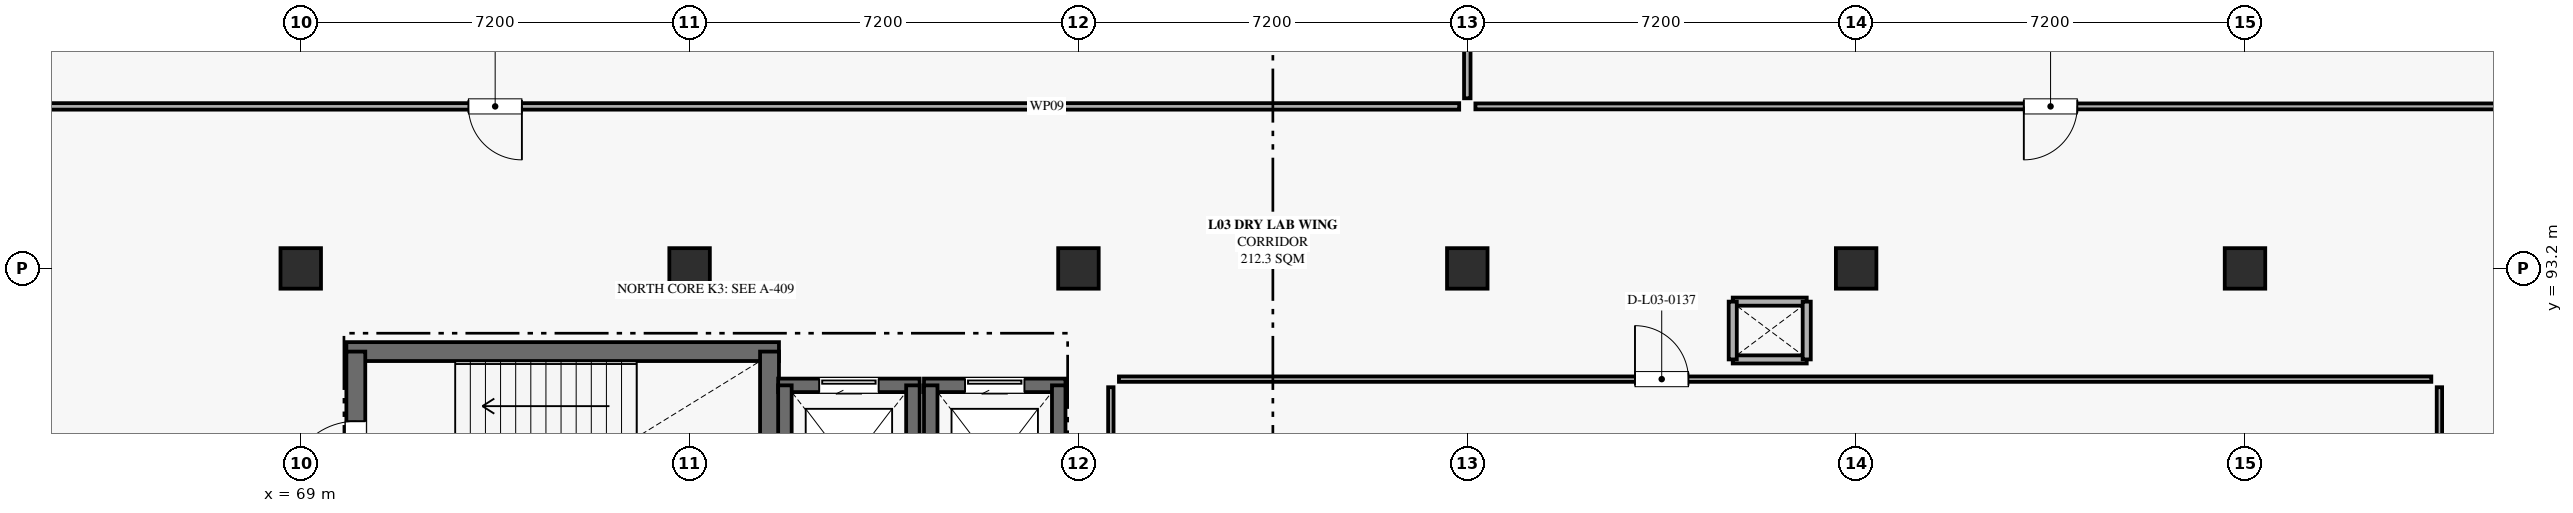
"""IFC4 building model, lengths in metres.
Left out: names, types, materials, properties, quantities, classifications, styles, units other than length and angle.
Written with IfcOpenShell. Run it as: python <this file> out.ifc"""

import sys

from ifc_helpers import new_model, si_unit, direction, frame, frame_2d, origin, origin_2d, place, context, subcontext, project, spatial, rectangle, extrude, element, fill, save


model = new_model("IFC4")
c1 = context("Model", 3, precision=1e-05, world=origin(), true_north=direction((0.0, 1.0)))
c2 = subcontext(c1, "Body", "Model", "MODEL_VIEW")
j1 = project(units=[si_unit("LENGTHUNIT", "METRE"), si_unit("PLANEANGLEUNIT", "RADIAN")], contexts=[c1])
p1 = place(None, origin())
s1 = spatial("IfcSite", under=j1, at=p1, CompositionType="ELEMENT")
p2 = place(p1, origin())
s2 = spatial("IfcBuilding", under=s1, at=p2, CompositionType="ELEMENT")
p3 = place(p2, frame((0.0, 0.0, 15.12)))
s3 = spatial("IfcBuildingStorey", under=s2, at=p3, CompositionType="ELEMENT", Elevation=15.12)
for number, where, z_axis, x_axis in (
    (1, (69.0, 93.2, 0.0), (0.0, 0.0, 1.0), (1.0, 0.0, 0.0)),
    (2, (76.2, 93.2, 0.0), (0.0, 0.0, 1.0), (1.0, 0.0, 0.0)),
    (3, (83.4, 93.2, 0.0), (0.0, 0.0, 1.0), (1.0, 0.0, 0.0)),
    (4, (90.6, 93.2, 0.0), (0.0, 0.0, 1.0), (1.0, 0.0, 0.0)),
    (5, (97.8, 93.2, 0.0), (0.0, 0.0, 1.0), (1.0, 0.0, 0.0)),
    (6, (105.0, 93.2, 0.0), (0.0, 0.0, 1.0), (1.0, 0.0, 0.0)),
):
    element("IfcColumn", number, at=place(p3, frame(where, z_axis=z_axis, x_axis=x_axis)), inside=s3, PredefinedType="COLUMN", context=c2, shape_type="SweptSolid", body=[
        extrude(rectangle(XDim=0.75, YDim=0.75, at=origin_2d()), origin(), (0.0, 0.0, 1.0), 4.68),
    ])
p4 = place(p3, frame((69.845, 91.66, 0.0), z_axis=(0.0, 0.0, 1.0), x_axis=(1.0, 0.0, 0.0)))
e7 = element("IfcWall", 7, at=p4, inside=s3, PredefinedType="SHEAR", context=c2, shape_type="SweptSolid", body=[
    extrude(rectangle(XDim=8.01, YDim=0.35, at=frame_2d((4.005, 0.0))), origin(), (0.0, 0.0, 1.0), 4.41),
])
p5 = place(p3, frame((70.02, 87.82, 0.0), z_axis=(0.0, 0.0, 1.0), x_axis=(0.0, 1.0, 0.0)))
e8 = element("IfcWall", 8, at=p5, inside=s3, PredefinedType="SHEAR", context=c2, shape_type="SweptSolid", body=[
    extrude(rectangle(XDim=3.84, YDim=0.35, at=frame_2d((1.92, 0.0))), origin(), (0.0, 0.0, 1.0), 4.41),
])
p6 = place(p5, frame((1.29, 0.0, 0.0)))
e9 = element("IfcOpeningElement", 9, at=p6, cuts=e8, PredefinedType="OPENING", context=c2, shape_type="SweptSolid", body=[
    extrude(rectangle(XDim=1.26, YDim=2.06, at=frame_2d((0.63, 1.03))), frame((0.0, 0.185, 0.0), z_axis=(0.0, -1.0, 0.0), x_axis=(1.0, 0.0, 0.0)), (0.0, 0.0, 1.0), 0.37),
])
p7 = place(p3, frame((77.68, 91.66, 0.0), z_axis=(0.0, 0.0, 1.0), x_axis=(0.0, -1.0, 0.0)))
e10 = element("IfcWall", 10, at=p7, inside=s3, PredefinedType="SHEAR", context=c2, shape_type="SweptSolid", body=[
    extrude(rectangle(XDim=3.84, YDim=0.35, at=frame_2d((1.92, 0.0))), origin(), (0.0, 0.0, 1.0), 4.41),
])
for number, where, z_axis, x_axis in (
    (11, (96.885, 91.515, 0.0), (0.0, 0.0, 1.0), (-1.0, 0.0, 0.0)),
    (12, (95.515, 92.585, 0.0), (0.0, 0.0, 1.0), (1.0, 0.0, 0.0)),
):
    element("IfcWall", number, at=place(p3, frame(where, z_axis=z_axis, x_axis=x_axis)), inside=s3, PredefinedType="PARTITIONING", context=c2, shape_type="SweptSolid", body=[
        extrude(rectangle(XDim=1.37, YDim=0.15, at=frame_2d((0.685, 0.0))), origin(), (0.0, 0.0, 1.0), 3.16),
    ])
for number, where, z_axis, x_axis in (
    (13, (95.515, 91.515, 0.0), (0.0, 0.0, 1.0), (0.0, 1.0, 0.0)),
    (14, (96.885, 92.585, 0.0), (0.0, 0.0, 1.0), (0.0, -1.0, 0.0)),
):
    element("IfcWall", number, at=place(p3, frame(where, z_axis=z_axis, x_axis=x_axis)), inside=s3, PredefinedType="PARTITIONING", context=c2, shape_type="SweptSolid", body=[
        extrude(rectangle(XDim=1.07, YDim=0.15, at=frame_2d((0.535, 0.0))), origin(), (0.0, 0.0, 1.0), 3.16),
    ])
p8 = place(p3, frame((77.84, 91.035, 0.0), z_axis=(0.0, 0.0, 1.0), x_axis=(1.0, 0.0, 0.0)))
e15 = element("IfcWall", 15, at=p8, inside=s3, PredefinedType="SHEAR", context=c2, shape_type="SweptSolid", body=[
    extrude(rectangle(XDim=2.62, YDim=0.25, at=frame_2d((1.31, 0.0))), origin(), (0.0, 0.0, 1.0), 4.41),
])
p9 = place(p8, frame((0.76, 0.0, 0.0)))
e16 = element("IfcOpeningElement", 16, at=p9, cuts=e15, PredefinedType="OPENING", context=c2, shape_type="SweptSolid", body=[
    extrude(rectangle(XDim=1.1, YDim=2.2, at=frame_2d((0.55, 1.1))), frame((0.0, 0.135, 0.0), z_axis=(0.0, -1.0, 0.0), x_axis=(1.0, 0.0, 0.0)), (0.0, 0.0, 1.0), 0.27),
])
for number, where, z_axis, x_axis in (
    (17, (77.965, 88.065, 0.0), (0.0, 0.0, 1.0), (0.0, 1.0, 0.0)),
    (18, (80.335, 91.035, 0.0), (0.0, 0.0, 1.0), (0.0, -1.0, 0.0)),
):
    element("IfcWall", number, at=place(p3, frame(where, z_axis=z_axis, x_axis=x_axis)), inside=s3, PredefinedType="SHEAR", context=c2, shape_type="SweptSolid", body=[
        extrude(rectangle(XDim=2.97, YDim=0.25, at=frame_2d((1.485, 0.0))), origin(), (0.0, 0.0, 1.0), 4.41),
    ])
p10 = place(p3, frame((80.54, 91.035, 0.0), z_axis=(0.0, 0.0, 1.0), x_axis=(1.0, 0.0, 0.0)))
e19 = element("IfcWall", 19, at=p10, inside=s3, PredefinedType="SHEAR", context=c2, shape_type="SweptSolid", body=[
    extrude(rectangle(XDim=2.62, YDim=0.25, at=frame_2d((1.31, 0.0))), origin(), (0.0, 0.0, 1.0), 4.41),
])
p11 = place(p10, frame((0.76, 0.0, 0.0)))
e20 = element("IfcOpeningElement", 20, at=p11, cuts=e19, PredefinedType="OPENING", context=c2, shape_type="SweptSolid", body=[
    extrude(rectangle(XDim=1.1, YDim=2.2, at=frame_2d((0.55, 1.1))), frame((0.0, 0.135, 0.0), z_axis=(0.0, -1.0, 0.0), x_axis=(1.0, 0.0, 0.0)), (0.0, 0.0, 1.0), 0.27),
])
for number, where, z_axis, x_axis in (
    (21, (80.665, 88.065, 0.0), (0.0, 0.0, 1.0), (0.0, 1.0, 0.0)),
    (22, (83.035, 91.035, 0.0), (0.0, 0.0, 1.0), (0.0, -1.0, 0.0)),
):
    element("IfcWall", number, at=place(p3, frame(where, z_axis=z_axis, x_axis=x_axis)), inside=s3, PredefinedType="SHEAR", context=c2, shape_type="SweptSolid", body=[
        extrude(rectangle(XDim=2.97, YDim=0.25, at=frame_2d((1.485, 0.0))), origin(), (0.0, 0.0, 1.0), 4.41),
    ])
p12 = place(p3, frame((90.45, 96.2, 0.0), z_axis=(0.0, 0.0, 1.0), x_axis=(-1.0, 0.0, 0.0)))
e23 = element("IfcWall", 23, at=p12, inside=s3, PredefinedType="PARTITIONING", context=c2, shape_type="SweptSolid", body=[
    extrude(rectangle(XDim=28.3, YDim=0.12, at=frame_2d((14.15, 0.0))), origin(), (0.0, 0.0, 1.0), 3.16),
])
p13 = place(p12, frame((17.355, 0.0, 0.0)))
e24 = element("IfcOpeningElement", 24, at=p13, cuts=e23, PredefinedType="OPENING", context=c2, shape_type="SweptSolid", body=[
    extrude(rectangle(XDim=0.99, YDim=2.05, at=frame_2d((0.495, 1.025))), frame((0.0, 0.07, 0.0), z_axis=(0.0, -1.0, 0.0), x_axis=(1.0, 0.0, 0.0)), (0.0, 0.0, 1.0), 0.14),
])
p14 = place(p3, frame((90.6, 114.2, 0.0), z_axis=(0.0, 0.0, 1.0), x_axis=(0.0, -1.0, 0.0)))
e25 = element("IfcWall", 25, at=p14, inside=s3, PredefinedType="PARTITIONING", context=c2, shape_type="SweptSolid", body=[
    extrude(rectangle(XDim=17.85, YDim=0.12, at=frame_2d((8.925, 0.0))), origin(), (0.0, 0.0, 1.0), 3.16),
])
p15 = place(p3, frame((111.85, 96.2, 0.0), z_axis=(0.0, 0.0, 1.0), x_axis=(-1.0, 0.0, 0.0)))
e26 = element("IfcWall", 26, at=p15, inside=s3, PredefinedType="PARTITIONING", context=c2, shape_type="SweptSolid", body=[
    extrude(rectangle(XDim=21.1, YDim=0.11, at=frame_2d((10.55, 0.0))), origin(), (0.0, 0.0, 1.0), 3.16),
])
p16 = place(p15, frame((9.955, 0.0, 0.0)))
e27 = element("IfcOpeningElement", 27, at=p16, cuts=e26, PredefinedType="OPENING", context=c2, shape_type="SweptSolid", body=[
    extrude(rectangle(XDim=0.99, YDim=2.1, at=frame_2d((0.495, 1.05))), frame((0.0, 0.065, 0.0), z_axis=(0.0, -1.0, 0.0), x_axis=(1.0, 0.0, 0.0)), (0.0, 0.0, 1.0), 0.13),
])
p17 = place(p3, frame((84.15, 91.15, 0.0), z_axis=(0.0, 0.0, 1.0), x_axis=(1.0, 0.0, 0.0)))
e28 = element("IfcWall", 28, at=p17, inside=s3, PredefinedType="PARTITIONING", context=c2, shape_type="SweptSolid", body=[
    extrude(rectangle(XDim=24.3, YDim=0.1, at=frame_2d((12.15, 0.0))), origin(), (0.0, 0.0, 1.0), 3.16),
])
p18 = place(p17, frame((9.555, 0.0, 0.0)))
e29 = element("IfcOpeningElement", 29, at=p18, cuts=e28, PredefinedType="OPENING", context=c2, shape_type="SweptSolid", body=[
    extrude(rectangle(XDim=0.99, YDim=2.16, at=frame_2d((0.495, 1.08))), frame((0.0, 0.06, 0.0), z_axis=(0.0, -1.0, 0.0), x_axis=(1.0, 0.0, 0.0)), (0.0, 0.0, 1.0), 0.12),
])
for number, where, z_axis, x_axis in (
    (30, (84.0, 86.35, 0.0), (0.0, 0.0, 1.0), (0.0, 1.0, 0.0)),
    (31, (108.6, 91.0, 0.0), (0.0, 0.0, 1.0), (0.0, -1.0, 0.0)),
):
    element("IfcWall", number, at=place(p3, frame(where, z_axis=z_axis, x_axis=x_axis)), inside=s3, PredefinedType="PARTITIONING", context=c2, shape_type="SweptSolid", body=[
        extrude(rectangle(XDim=4.65, YDim=0.1, at=frame_2d((2.325, 0.0))), origin(), (0.0, 0.0, 1.0), 3.16),
    ])
p19 = place(p6, origin())
e32 = element("IfcDoor", 32, at=p19, inside=s3, OperationType="SINGLE_SWING_LEFT", PredefinedType="DOOR", context=c2, shape_type="SweptSolid", body=[
    extrude(rectangle(XDim=1.26, YDim=2.06, at=frame_2d((0.63, 1.03))), frame((0.0, 0.025, 0.0), z_axis=(0.0, -1.0, 0.0), x_axis=(1.0, 0.0, 0.0)), (0.0, 0.0, 1.0), 0.05),
])
fill(e9, e32)
p20 = place(p9, origin())
e33 = element("IfcDoor", 33, at=p20, inside=s3, OperationType="SLIDING_TO_LEFT", PredefinedType="DOOR", context=c2, shape_type="SweptSolid", body=[
    extrude(rectangle(XDim=1.1, YDim=2.2, at=frame_2d((0.55, 1.1))), frame((0.0, 0.025, 0.0), z_axis=(0.0, -1.0, 0.0), x_axis=(1.0, 0.0, 0.0)), (0.0, 0.0, 1.0), 0.05),
])
fill(e16, e33)
p21 = place(p11, origin())
e34 = element("IfcDoor", 34, at=p21, inside=s3, OperationType="SLIDING_TO_LEFT", PredefinedType="DOOR", context=c2, shape_type="SweptSolid", body=[
    extrude(rectangle(XDim=1.1, YDim=2.2, at=frame_2d((0.55, 1.1))), frame((0.0, 0.025, 0.0), z_axis=(0.0, -1.0, 0.0), x_axis=(1.0, 0.0, 0.0)), (0.0, 0.0, 1.0), 0.05),
])
fill(e20, e34)
p22 = place(p13, origin())
e35 = element("IfcDoor", 35, at=p22, inside=s3, OperationType="SINGLE_SWING_LEFT", PredefinedType="DOOR", context=c2, shape_type="SweptSolid", body=[
    extrude(rectangle(XDim=0.99, YDim=2.05, at=frame_2d((0.495, 1.025))), frame((0.0, 0.025, 0.0), z_axis=(0.0, -1.0, 0.0), x_axis=(1.0, 0.0, 0.0)), (0.0, 0.0, 1.0), 0.05),
])
fill(e24, e35)
p23 = place(p16, origin())
e36 = element("IfcDoor", 36, at=p23, inside=s3, OperationType="SINGLE_SWING_RIGHT", PredefinedType="DOOR", context=c2, shape_type="SweptSolid", body=[
    extrude(rectangle(XDim=0.99, YDim=2.1, at=frame_2d((0.495, 1.05))), frame((0.0, 0.025, 0.0), z_axis=(0.0, -1.0, 0.0), x_axis=(1.0, 0.0, 0.0)), (0.0, 0.0, 1.0), 0.05),
])
fill(e27, e36)
p24 = place(p18, origin())
e37 = element("IfcDoor", 37, at=p24, inside=s3, OperationType="SINGLE_SWING_LEFT", PredefinedType="DOOR", context=c2, shape_type="SweptSolid", body=[
    extrude(rectangle(XDim=0.99, YDim=2.16, at=frame_2d((0.495, 1.08))), frame((0.0, 0.025, 0.0), z_axis=(0.0, -1.0, 0.0), x_axis=(1.0, 0.0, 0.0)), (0.0, 0.0, 1.0), 0.05),
])
fill(e29, e37)
save(model, sys.argv[1])
